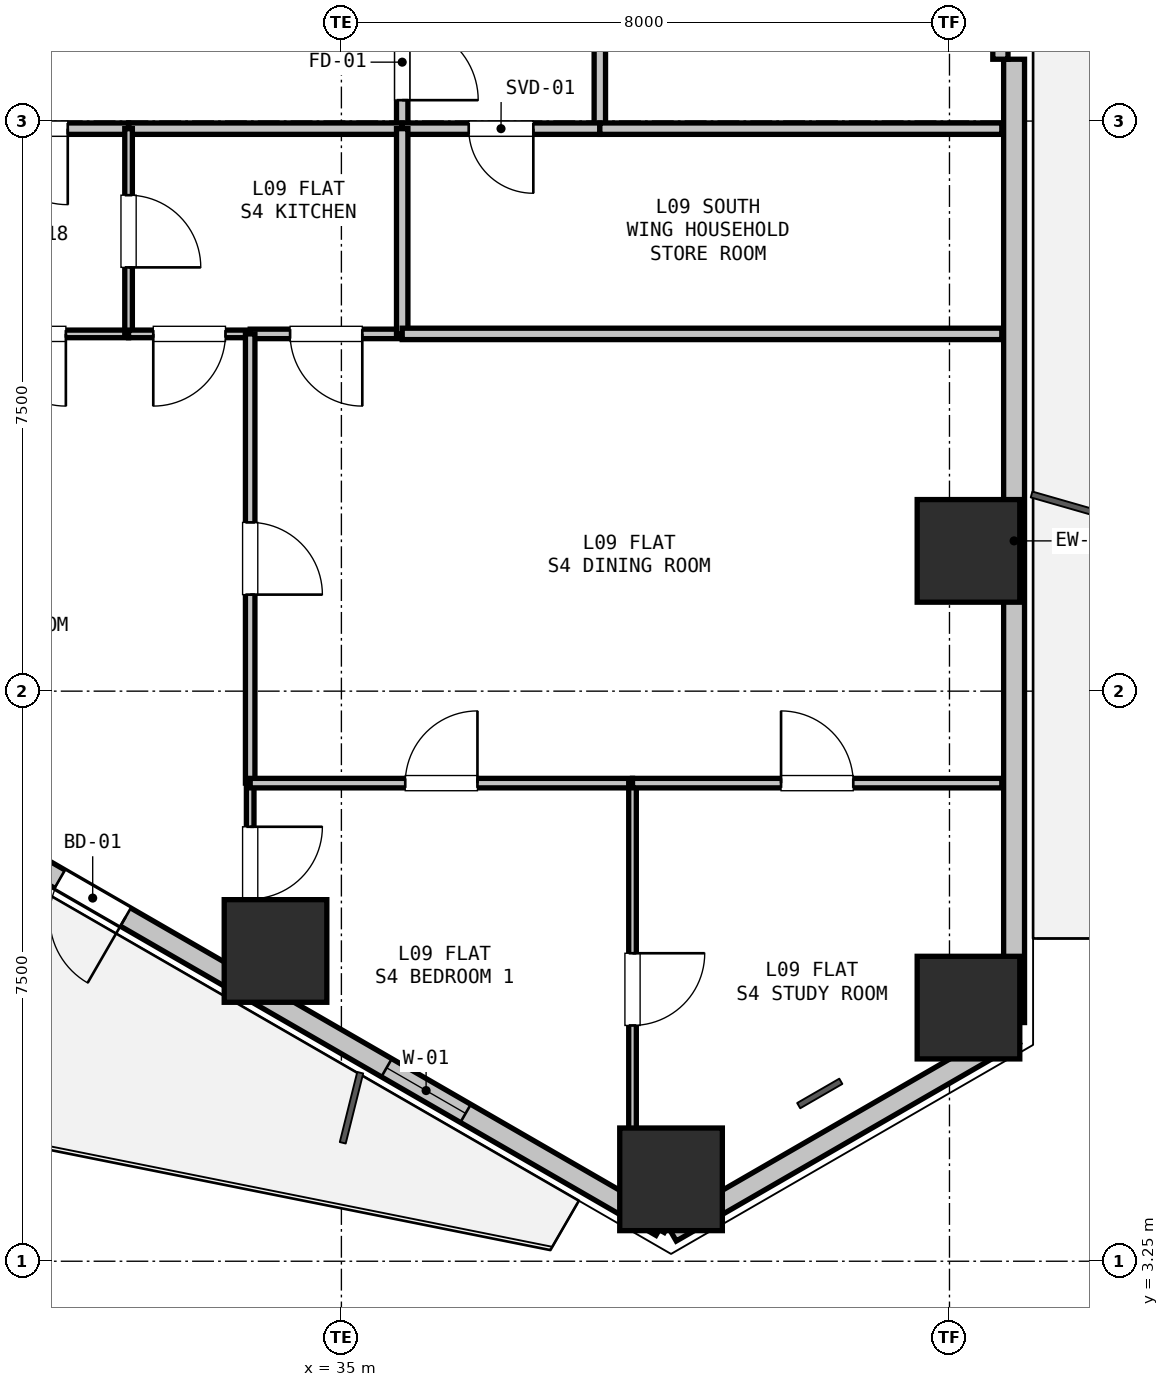
"""IFC4 building model, lengths in metres.
Left out: names, types, materials, properties, quantities, classifications, styles, units other than length and angle.
Written with IfcOpenShell. Run it as: python <this file> out.ifc"""

import sys

from ifc_helpers import new_model, si_unit, direction, frame, frame_2d, origin, origin_2d, place, context, subcontext, project, spatial, rectangle, hollow_rectangle, extrude, element, fill, save


model = new_model("IFC4")
c1 = context("Model", 3, precision=1e-05, world=origin(), true_north=direction((0.0, 1.0)))
c2 = subcontext(c1, "Body", "Model", "MODEL_VIEW")
j1 = project(units=[si_unit("LENGTHUNIT", "METRE"), si_unit("PLANEANGLEUNIT", "RADIAN")], contexts=[c1])
p1 = place(None, origin())
s1 = spatial("IfcSite", under=j1, at=p1, CompositionType="ELEMENT")
p2 = place(p1, origin())
s2 = spatial("IfcBuilding", under=s1, at=p2, CompositionType="ELEMENT")
p3 = place(p2, frame((0.0, 0.0, 35.7)))
s3 = spatial("IfcBuildingStorey", under=s2, at=p3, CompositionType="ELEMENT", Elevation=35.7)
for number, where, z_axis, x_axis in (
    (1, (43.25, 12.595, 0.0), (0.0, 0.0, 1.0), (1.0, 0.0, 0.0)),
    (2, (43.25, 6.587, 0.0), (0.0, 0.0, 1.0), (1.0, 0.0, 0.0)),
    (3, (39.337, 4.327, 0.0), (0.0, 0.0, 1.0), (1.0, 0.0, 0.0)),
    (4, (34.133, 7.332, 0.0), (0.0, 0.0, 1.0), (1.0, 0.0, 0.0)),
):
    element("IfcColumn", number, at=place(p3, frame(where, z_axis=z_axis, x_axis=x_axis)), inside=s3, PredefinedType="COLUMN", context=c2, shape_type="SweptSolid", body=[
        extrude(hollow_rectangle(XDim=1.35, YDim=1.35, WallThickness=0.036, at=origin_2d()), origin(), (0.0, 0.0, 1.0), 3.3),
    ])
p4 = place(p3, frame((43.85, 6.24, 0.0), z_axis=(0.0, 0.0, 1.0), x_axis=(-0.866043601342, -0.499968479581, 0.0)))
e5 = element("IfcWall", 5, at=p4, inside=s3, PredefinedType="SOLIDWALL", context=c2, shape_type="SweptSolid", body=[
    extrude(rectangle(XDim=5.211, YDim=0.275, at=frame_2d((2.605, 0.0))), origin(), (0.0, 0.0, 1.0), 2.66),
])
p5 = place(p3, frame((43.85, 19.063, 0.0), z_axis=(0.0, 0.0, 1.0), x_axis=(0.0, -1.0, 0.0)))
e6 = element("IfcWall", 6, at=p5, inside=s3, PredefinedType="SOLIDWALL", context=c2, shape_type="SweptSolid", body=[
    extrude(rectangle(XDim=12.673, YDim=0.275, at=frame_2d((6.336, 0.0))), origin(), (0.0, 0.0, 1.0), 2.66),
])
p6 = place(p3, frame((43.67, 20.763, 0.0), z_axis=(0.0, 0.0, 1.0), x_axis=(0.0, -1.0, 0.0)))
e7 = element("IfcWall", 7, at=p6, inside=s3, PredefinedType="PARAPET", context=c2, shape_type="SweptSolid", body=[
    extrude(rectangle(XDim=1.7, YDim=0.2, at=frame_2d((0.85, 0.0))), origin(), (0.0, 0.0, 1.0), 2.66),
])
p7 = place(p3, frame((39.207, 3.71, 0.0), z_axis=(0.0, 0.0, 1.0), x_axis=(-0.86603192154, 0.499988710747, 0.0)))
e8 = element("IfcWall", 8, at=p7, inside=s3, PredefinedType="SOLIDWALL", context=c2, shape_type="SweptSolid", body=[
    extrude(rectangle(XDim=12.673, YDim=0.275, at=frame_2d((6.336, 0.0))), origin(), (0.0, 0.0, 1.0), 2.66),
])
p8 = place(p7, frame((8.136, 0.0, 0.0)))
e9 = element("IfcOpeningElement", 9, at=p8, cuts=e8, PredefinedType="OPENING", context=c2, shape_type="SweptSolid", body=[
    extrude(rectangle(XDim=1.0, YDim=2.1, at=frame_2d((0.5, 1.05))), frame((0.0, 0.147, 0.0), z_axis=(0.0, -1.0, 0.0), x_axis=(1.0, 0.0, 0.0)), (0.0, 0.0, 1.0), 0.295),
])
p9 = place(p7, frame((2.971, 0.0, 0.9)))
e10 = element("IfcOpeningElement", 10, at=p9, cuts=e8, PredefinedType="OPENING", context=c2, shape_type="SweptSolid", body=[
    extrude(rectangle(XDim=1.2, YDim=1.4, at=frame_2d((0.6, 0.7))), frame((0.0, 0.147, 0.0), z_axis=(0.0, -1.0, 0.0), x_axis=(1.0, 0.0, 0.0)), (0.0, 0.0, 1.0), 0.295),
])
p10 = place(p3, frame((35.8, 19.9, 0.0), z_axis=(0.0, 0.0, 1.0), x_axis=(0.0, -1.0, 0.0)))
e11 = element("IfcWall", 11, at=p10, inside=s3, PredefinedType="PARTITIONING", context=c2, shape_type="SweptSolid", body=[
    extrude(rectangle(XDim=1.75, YDim=0.15, at=frame_2d((0.875, 0.0))), origin(), (0.0, 0.0, 1.0), 3.04),
])
p11 = place(p10, frame((0.375, 0.0, 0.0)))
e12 = element("IfcOpeningElement", 12, at=p11, cuts=e11, PredefinedType="OPENING", context=c2, shape_type="SweptSolid", body=[
    extrude(rectangle(XDim=1.0, YDim=2.15, at=frame_2d((0.5, 1.075))), frame((0.0, 0.085, 0.0), z_axis=(0.0, -1.0, 0.0), x_axis=(1.0, 0.0, 0.0)), (0.0, 0.0, 1.0), 0.17),
])
p12 = place(p3, frame((35.8, 18.15, 0.0), z_axis=(0.0, 0.0, 1.0), x_axis=(-1.0, 0.0, 0.0)))
e13 = element("IfcWall", 13, at=p12, inside=s3, PredefinedType="PARTITIONING", context=c2, shape_type="SweptSolid", body=[
    extrude(rectangle(XDim=3.6, YDim=0.15, at=frame_2d((1.8, 0.0))), origin(), (0.0, 0.0, 1.0), 3.04),
])
p13 = place(p3, frame((32.2, 18.15, 0.0), z_axis=(0.0, 0.0, 1.0), x_axis=(-1.0, 0.0, 0.0)))
e14 = element("IfcWall", 14, at=p13, inside=s3, PredefinedType="PARTITIONING", context=c2, shape_type="SweptSolid", body=[
    extrude(rectangle(XDim=2.6, YDim=0.15, at=frame_2d((1.3, 0.0))), origin(), (0.0, 0.0, 1.0), 3.04),
])
p14 = place(p13, frame((0.8, 0.0, 0.0)))
e15 = element("IfcOpeningElement", 15, at=p14, cuts=e14, PredefinedType="OPENING", context=c2, shape_type="SweptSolid", body=[
    extrude(rectangle(XDim=1.0, YDim=2.15, at=frame_2d((0.5, 1.075))), frame((0.0, 0.085, 0.0), z_axis=(0.0, -1.0, 0.0), x_axis=(1.0, 0.0, 0.0)), (0.0, 0.0, 1.0), 0.17),
])
p15 = place(p3, frame((38.4, 21.4, 0.0), z_axis=(0.0, 0.0, 1.0), x_axis=(0.0, -1.0, 0.0)))
e16 = element("IfcWall", 16, at=p15, inside=s3, PredefinedType="PARTITIONING", context=c2, shape_type="SweptSolid", body=[
    extrude(rectangle(XDim=3.25, YDim=0.15, at=frame_2d((1.625, 0.0))), origin(), (0.0, 0.0, 1.0), 3.04),
])
p16 = place(p3, frame((38.4, 18.15, 0.0), z_axis=(0.0, 0.0, 1.0), x_axis=(-1.0, 0.0, 0.0)))
e17 = element("IfcWall", 17, at=p16, inside=s3, PredefinedType="PARTITIONING", context=c2, shape_type="SweptSolid", body=[
    extrude(rectangle(XDim=2.6, YDim=0.15, at=frame_2d((1.3, 0.0))), origin(), (0.0, 0.0, 1.0), 2.338),
])
p17 = place(p16, frame((0.875, 0.0, 0.0)))
e18 = element("IfcOpeningElement", 18, at=p17, cuts=e17, PredefinedType="OPENING", context=c2, shape_type="SweptSolid", body=[
    extrude(rectangle(XDim=0.85, YDim=2.1, at=frame_2d((0.425, 1.05))), frame((0.0, 0.085, 0.0), z_axis=(0.0, -1.0, 0.0), x_axis=(1.0, 0.0, 0.0)), (0.0, 0.0, 1.0), 0.17),
])
p18 = place(p3, frame((32.2, 15.45, 0.0), z_axis=(0.0, 0.0, 1.0), x_axis=(-1.0, 0.0, 0.0)))
e19 = element("IfcWall", 19, at=p18, inside=s3, PredefinedType="PARTITIONING", context=c2, shape_type="SweptSolid", body=[
    extrude(rectangle(XDim=2.6, YDim=0.1, at=frame_2d((1.3, 0.0))), origin(), (0.0, 0.0, 1.0), 3.04),
])
p19 = place(p18, frame((0.825, 0.0, 0.0)))
e20 = element("IfcOpeningElement", 20, at=p19, cuts=e19, PredefinedType="OPENING", context=c2, shape_type="SweptSolid", body=[
    extrude(rectangle(XDim=0.95, YDim=2.1, at=frame_2d((0.475, 1.05))), frame((0.0, 0.06, 0.0), z_axis=(0.0, -1.0, 0.0), x_axis=(1.0, 0.0, 0.0)), (0.0, 0.0, 1.0), 0.12),
])
p20 = place(p3, frame((32.2, 18.15, 0.0), z_axis=(0.0, 0.0, 1.0), x_axis=(0.0, -1.0, 0.0)))
e21 = element("IfcWall", 21, at=p20, inside=s3, PredefinedType="PARTITIONING", context=c2, shape_type="SweptSolid", body=[
    extrude(rectangle(XDim=2.7, YDim=0.1, at=frame_2d((1.35, 0.0))), origin(), (0.0, 0.0, 1.0), 3.04),
])
p21 = place(p20, frame((0.875, 0.0, 0.0)))
e22 = element("IfcOpeningElement", 22, at=p21, cuts=e21, PredefinedType="OPENING", context=c2, shape_type="SweptSolid", body=[
    extrude(rectangle(XDim=0.95, YDim=2.1, at=frame_2d((0.475, 1.05))), frame((0.0, 0.06, 0.0), z_axis=(0.0, -1.0, 0.0), x_axis=(1.0, 0.0, 0.0)), (0.0, 0.0, 1.0), 0.12),
])
p22 = place(p3, frame((35.8, 15.45, 0.0), z_axis=(0.0, 0.0, 1.0), x_axis=(-1.0, 0.0, 0.0)))
e23 = element("IfcWall", 23, at=p22, inside=s3, PredefinedType="PARTITIONING", context=c2, shape_type="SweptSolid", body=[
    extrude(rectangle(XDim=2.0, YDim=0.125, at=frame_2d((1.0, 0.0))), origin(), (0.0, 0.0, 1.0), 3.04),
])
p23 = place(p22, frame((0.525, 0.0, 0.0)))
e24 = element("IfcOpeningElement", 24, at=p23, cuts=e23, PredefinedType="OPENING", context=c2, shape_type="SweptSolid", body=[
    extrude(rectangle(XDim=0.95, YDim=2.1, at=frame_2d((0.475, 1.05))), frame((0.0, 0.073, 0.0), z_axis=(0.0, -1.0, 0.0), x_axis=(1.0, 0.0, 0.0)), (0.0, 0.0, 1.0), 0.145),
])
p24 = place(p3, frame((33.8, 15.45, 0.0), z_axis=(0.0, 0.0, 1.0), x_axis=(-1.0, 0.0, 0.0)))
e25 = element("IfcWall", 25, at=p24, inside=s3, PredefinedType="PARTITIONING", context=c2, shape_type="SweptSolid", body=[
    extrude(rectangle(XDim=1.6, YDim=0.1, at=frame_2d((0.8, 0.0))), origin(), (0.0, 0.0, 1.0), 3.04),
])
p25 = place(p24, frame((0.325, 0.0, 0.0)))
e26 = element("IfcOpeningElement", 26, at=p25, cuts=e25, PredefinedType="OPENING", context=c2, shape_type="SweptSolid", body=[
    extrude(rectangle(XDim=0.95, YDim=2.1, at=frame_2d((0.475, 1.05))), frame((0.0, 0.06, 0.0), z_axis=(0.0, -1.0, 0.0), x_axis=(1.0, 0.0, 0.0)), (0.0, 0.0, 1.0), 0.12),
])
p26 = place(p3, frame((35.8, 18.15, 0.0), z_axis=(0.0, 0.0, 1.0), x_axis=(0.0, -1.0, 0.0)))
e27 = element("IfcWall", 27, at=p26, inside=s3, PredefinedType="PARTITIONING", context=c2, shape_type="SweptSolid", body=[
    extrude(rectangle(XDim=2.7, YDim=0.15, at=frame_2d((1.35, 0.0))), origin(), (0.0, 0.0, 1.0), 3.04),
])
p27 = place(p3, frame((43.688, 18.15, 0.0), z_axis=(0.0, 0.0, 1.0), x_axis=(-1.0, 0.0, 0.0)))
e28 = element("IfcWall", 28, at=p27, inside=s3, PredefinedType="PARTITIONING", context=c2, shape_type="SweptSolid", body=[
    extrude(rectangle(XDim=5.289, YDim=0.15, at=frame_2d((2.644, 0.0))), origin(), (0.0, 0.0, 1.0), 2.365),
])
p28 = place(p3, frame((43.688, 15.45, 0.0), z_axis=(0.0, 0.0, 1.0), x_axis=(-1.0, 0.0, 0.0)))
e29 = element("IfcWall", 29, at=p28, inside=s3, PredefinedType="PARTITIONING", context=c2, shape_type="SweptSolid", body=[
    extrude(rectangle(XDim=7.888, YDim=0.15, at=frame_2d((3.944, 0.0))), origin(), (0.0, 0.0, 1.0), 2.338),
])
p29 = place(p3, frame((33.8, 15.45, 0.0), z_axis=(0.0, 0.0, 1.0), x_axis=(0.0, -1.0, 0.0)))
e30 = element("IfcWall", 30, at=p29, inside=s3, PredefinedType="PARTITIONING", context=c2, shape_type="SweptSolid", body=[
    extrude(rectangle(XDim=5.91, YDim=0.125, at=frame_2d((2.955, 0.0))), origin(), (0.0, 0.0, 1.0), 3.04),
])
p30 = place(p29, frame((2.48, 0.0, 0.0)))
e31 = element("IfcOpeningElement", 31, at=p30, cuts=e30, PredefinedType="OPENING", context=c2, shape_type="SweptSolid", body=[
    extrude(rectangle(XDim=0.95, YDim=2.1, at=frame_2d((0.475, 1.05))), frame((0.0, 0.073, 0.0), z_axis=(0.0, -1.0, 0.0), x_axis=(1.0, 0.0, 0.0)), (0.0, 0.0, 1.0), 0.145),
])
p31 = place(p3, frame((33.8, 9.54, 0.0), z_axis=(0.0, 0.0, 1.0), x_axis=(0.0, -1.0, 0.0)))
e32 = element("IfcWall", 32, at=p31, inside=s3, PredefinedType="PARTITIONING", context=c2, shape_type="SweptSolid", body=[
    extrude(rectangle(XDim=2.522, YDim=0.1, at=frame_2d((1.261, 0.0))), origin(), (0.0, 0.0, 1.0), 2.338),
])
p32 = place(p31, frame((0.574, 0.0, 0.0)))
e33 = element("IfcOpeningElement", 33, at=p32, cuts=e32, PredefinedType="OPENING", context=c2, shape_type="SweptSolid", body=[
    extrude(rectangle(XDim=0.95, YDim=2.1, at=frame_2d((0.475, 1.05))), frame((0.0, 0.06, 0.0), z_axis=(0.0, -1.0, 0.0), x_axis=(1.0, 0.0, 0.0)), (0.0, 0.0, 1.0), 0.12),
])
p33 = place(p3, frame((33.8, 9.54, 0.0), z_axis=(0.0, 0.0, 1.0), x_axis=(1.0, 0.0, 0.0)))
e34 = element("IfcWall", 34, at=p33, inside=s3, PredefinedType="PARTITIONING", context=c2, shape_type="SweptSolid", body=[
    extrude(rectangle(XDim=5.03, YDim=0.125, at=frame_2d((2.515, 0.0))), origin(), (0.0, 0.0, 1.0), 3.04),
])
p34 = place(p33, frame((2.04, 0.0, 0.0)))
e35 = element("IfcOpeningElement", 35, at=p34, cuts=e34, PredefinedType="OPENING", context=c2, shape_type="SweptSolid", body=[
    extrude(rectangle(XDim=0.95, YDim=2.1, at=frame_2d((0.475, 1.05))), frame((0.0, 0.073, 0.0), z_axis=(0.0, -1.0, 0.0), x_axis=(1.0, 0.0, 0.0)), (0.0, 0.0, 1.0), 0.145),
])
p35 = place(p3, frame((38.83, 9.54, 0.0), z_axis=(0.0, 0.0, 1.0), x_axis=(0.0, -1.0, 0.0)))
e36 = element("IfcWall", 36, at=p35, inside=s3, PredefinedType="PARTITIONING", context=c2, shape_type="SweptSolid", body=[
    extrude(rectangle(XDim=5.426, YDim=0.1, at=frame_2d((2.713, 0.0))), origin(), (0.0, 0.0, 1.0), 2.65),
])
p36 = place(p35, frame((2.238, 0.0, 0.0)))
e37 = element("IfcOpeningElement", 37, at=p36, cuts=e36, PredefinedType="OPENING", context=c2, shape_type="SweptSolid", body=[
    extrude(rectangle(XDim=0.95, YDim=2.1, at=frame_2d((0.475, 1.05))), frame((0.0, 0.06, 0.0), z_axis=(0.0, -1.0, 0.0), x_axis=(1.0, 0.0, 0.0)), (0.0, 0.0, 1.0), 0.12),
])
p37 = place(p3, frame((38.83, 9.54, 0.0), z_axis=(0.0, 0.0, 1.0), x_axis=(1.0, 0.0, 0.0)))
e38 = element("IfcWall", 38, at=p37, inside=s3, PredefinedType="PARTITIONING", context=c2, shape_type="SweptSolid", body=[
    extrude(rectangle(XDim=4.858, YDim=0.125, at=frame_2d((2.429, 0.0))), origin(), (0.0, 0.0, 1.0), 2.338),
])
p38 = place(p37, frame((1.954, 0.0, 0.0)))
e39 = element("IfcOpeningElement", 39, at=p38, cuts=e38, PredefinedType="OPENING", context=c2, shape_type="SweptSolid", body=[
    extrude(rectangle(XDim=0.95, YDim=2.1, at=frame_2d((0.475, 1.05))), frame((0.0, 0.073, 0.0), z_axis=(0.0, -1.0, 0.0), x_axis=(1.0, 0.0, 0.0)), (0.0, 0.0, 1.0), 0.145),
])
p39 = place(p3, frame((39.272, 3.672, 0.0), z_axis=(0.0, 0.0, 1.0), x_axis=(-0.866442544969, 0.49927679324, 0.0)))
e40 = element("IfcWall", 40, at=p39, inside=s3, PredefinedType="PARTITIONING", context=c2, shape_type="SweptSolid", body=[
    extrude(rectangle(XDim=0.142, YDim=0.1, at=frame_2d((0.071, 0.0))), origin(), (0.0, 0.0, 1.0), 3.04),
])
p40 = place(p8, origin())
e41 = element("IfcDoor", 41, at=p40, inside=s3, OperationType="SINGLE_SWING_LEFT", PredefinedType="DOOR", context=c2, shape_type="SweptSolid", body=[
    extrude(rectangle(XDim=1.0, YDim=2.1, at=frame_2d((0.5, 1.05))), frame((0.0, 0.025, 0.0), z_axis=(0.0, -1.0, 0.0), x_axis=(1.0, 0.0, 0.0)), (0.0, 0.0, 1.0), 0.05),
])
fill(e9, e41)
p41 = place(p9, origin())
e42 = element("IfcWindow", 42, at=p41, inside=s3, PartitioningType="SINGLE_PANEL", PredefinedType="WINDOW", context=c2, shape_type="SweptSolid", body=[
    extrude(rectangle(XDim=1.2, YDim=1.4, at=frame_2d((0.6, 0.7))), frame((0.0, 0.03, 0.0), z_axis=(0.0, -1.0, 0.0), x_axis=(1.0, 0.0, 0.0)), (0.0, 0.0, 1.0), 0.06),
])
fill(e10, e42)
p42 = place(p11, origin())
e43 = element("IfcDoor", 43, at=p42, inside=s3, OperationType="SINGLE_SWING_RIGHT", PredefinedType="DOOR", context=c2, shape_type="SweptSolid", body=[
    extrude(rectangle(XDim=1.0, YDim=2.15, at=frame_2d((0.5, 1.075))), frame((0.0, 0.025, 0.0), z_axis=(0.0, -1.0, 0.0), x_axis=(1.0, 0.0, 0.0)), (0.0, 0.0, 1.0), 0.05),
])
fill(e12, e43)
p43 = place(p14, origin())
e44 = element("IfcDoor", 44, at=p43, inside=s3, OperationType="SINGLE_SWING_LEFT", PredefinedType="DOOR", context=c2, shape_type="SweptSolid", body=[
    extrude(rectangle(XDim=1.0, YDim=2.15, at=frame_2d((0.5, 1.075))), frame((0.0, 0.025, 0.0), z_axis=(0.0, -1.0, 0.0), x_axis=(1.0, 0.0, 0.0)), (0.0, 0.0, 1.0), 0.05),
])
fill(e15, e44)
p44 = place(p17, origin())
e45 = element("IfcDoor", 45, at=p44, inside=s3, OperationType="SINGLE_SWING_LEFT", PredefinedType="DOOR", context=c2, shape_type="SweptSolid", body=[
    extrude(rectangle(XDim=0.85, YDim=2.1, at=frame_2d((0.425, 1.05))), frame((0.0, 0.025, 0.0), z_axis=(0.0, -1.0, 0.0), x_axis=(1.0, 0.0, 0.0)), (0.0, 0.0, 1.0), 0.05),
])
fill(e18, e45)
p45 = place(p21, origin())
e46 = element("IfcDoor", 46, at=p45, inside=s3, OperationType="SINGLE_SWING_RIGHT", PredefinedType="DOOR", context=c2, shape_type="SweptSolid", body=[
    extrude(rectangle(XDim=0.95, YDim=2.1, at=frame_2d((0.475, 1.05))), frame((0.0, 0.025, 0.0), z_axis=(0.0, -1.0, 0.0), x_axis=(1.0, 0.0, 0.0)), (0.0, 0.0, 1.0), 0.05),
])
fill(e22, e46)
p46 = place(p19, origin())
e47 = element("IfcDoor", 47, at=p46, inside=s3, OperationType="SINGLE_SWING_LEFT", PredefinedType="DOOR", context=c2, shape_type="SweptSolid", body=[
    extrude(rectangle(XDim=0.95, YDim=2.1, at=frame_2d((0.475, 1.05))), frame((0.0, 0.025, 0.0), z_axis=(0.0, -1.0, 0.0), x_axis=(1.0, 0.0, 0.0)), (0.0, 0.0, 1.0), 0.05),
])
fill(e20, e47)
p47 = place(p25, origin())
e48 = element("IfcDoor", 48, at=p47, inside=s3, OperationType="SINGLE_SWING_RIGHT", PredefinedType="DOOR", context=c2, shape_type="SweptSolid", body=[
    extrude(rectangle(XDim=0.95, YDim=2.1, at=frame_2d((0.475, 1.05))), frame((0.0, 0.025, 0.0), z_axis=(0.0, -1.0, 0.0), x_axis=(1.0, 0.0, 0.0)), (0.0, 0.0, 1.0), 0.05),
])
fill(e26, e48)
p48 = place(p23, origin())
e49 = element("IfcDoor", 49, at=p48, inside=s3, OperationType="SINGLE_SWING_LEFT", PredefinedType="DOOR", context=c2, shape_type="SweptSolid", body=[
    extrude(rectangle(XDim=0.95, YDim=2.1, at=frame_2d((0.475, 1.05))), frame((0.0, 0.025, 0.0), z_axis=(0.0, -1.0, 0.0), x_axis=(1.0, 0.0, 0.0)), (0.0, 0.0, 1.0), 0.05),
])
fill(e24, e49)
p49 = place(p32, origin())
e50 = element("IfcDoor", 50, at=p49, inside=s3, OperationType="SINGLE_SWING_LEFT", PredefinedType="DOOR", context=c2, shape_type="SweptSolid", body=[
    extrude(rectangle(XDim=0.95, YDim=2.1, at=frame_2d((0.475, 1.05))), frame((0.0, 0.025, 0.0), z_axis=(0.0, -1.0, 0.0), x_axis=(1.0, 0.0, 0.0)), (0.0, 0.0, 1.0), 0.05),
])
fill(e33, e50)
p50 = place(p30, origin())
e51 = element("IfcDoor", 51, at=p50, inside=s3, OperationType="SINGLE_SWING_RIGHT", PredefinedType="DOOR", context=c2, shape_type="SweptSolid", body=[
    extrude(rectangle(XDim=0.95, YDim=2.1, at=frame_2d((0.475, 1.05))), frame((0.0, 0.025, 0.0), z_axis=(0.0, -1.0, 0.0), x_axis=(1.0, 0.0, 0.0)), (0.0, 0.0, 1.0), 0.05),
])
fill(e31, e51)
p51 = place(p36, origin())
e52 = element("IfcDoor", 52, at=p51, inside=s3, OperationType="SINGLE_SWING_LEFT", PredefinedType="DOOR", context=c2, shape_type="SweptSolid", body=[
    extrude(rectangle(XDim=0.95, YDim=2.1, at=frame_2d((0.475, 1.05))), frame((0.0, 0.025, 0.0), z_axis=(0.0, -1.0, 0.0), x_axis=(1.0, 0.0, 0.0)), (0.0, 0.0, 1.0), 0.05),
])
fill(e37, e52)
p52 = place(p34, origin())
e53 = element("IfcDoor", 53, at=p52, inside=s3, OperationType="SINGLE_SWING_RIGHT", PredefinedType="DOOR", context=c2, shape_type="SweptSolid", body=[
    extrude(rectangle(XDim=0.95, YDim=2.1, at=frame_2d((0.475, 1.05))), frame((0.0, 0.025, 0.0), z_axis=(0.0, -1.0, 0.0), x_axis=(1.0, 0.0, 0.0)), (0.0, 0.0, 1.0), 0.05),
])
fill(e35, e53)
p53 = place(p38, origin())
e54 = element("IfcDoor", 54, at=p53, inside=s3, OperationType="SINGLE_SWING_LEFT", PredefinedType="DOOR", context=c2, shape_type="SweptSolid", body=[
    extrude(rectangle(XDim=0.95, YDim=2.1, at=frame_2d((0.475, 1.05))), frame((0.0, 0.025, 0.0), z_axis=(0.0, -1.0, 0.0), x_axis=(1.0, 0.0, 0.0)), (0.0, 0.0, 1.0), 0.05),
])
fill(e39, e54)
save(model, sys.argv[1])
